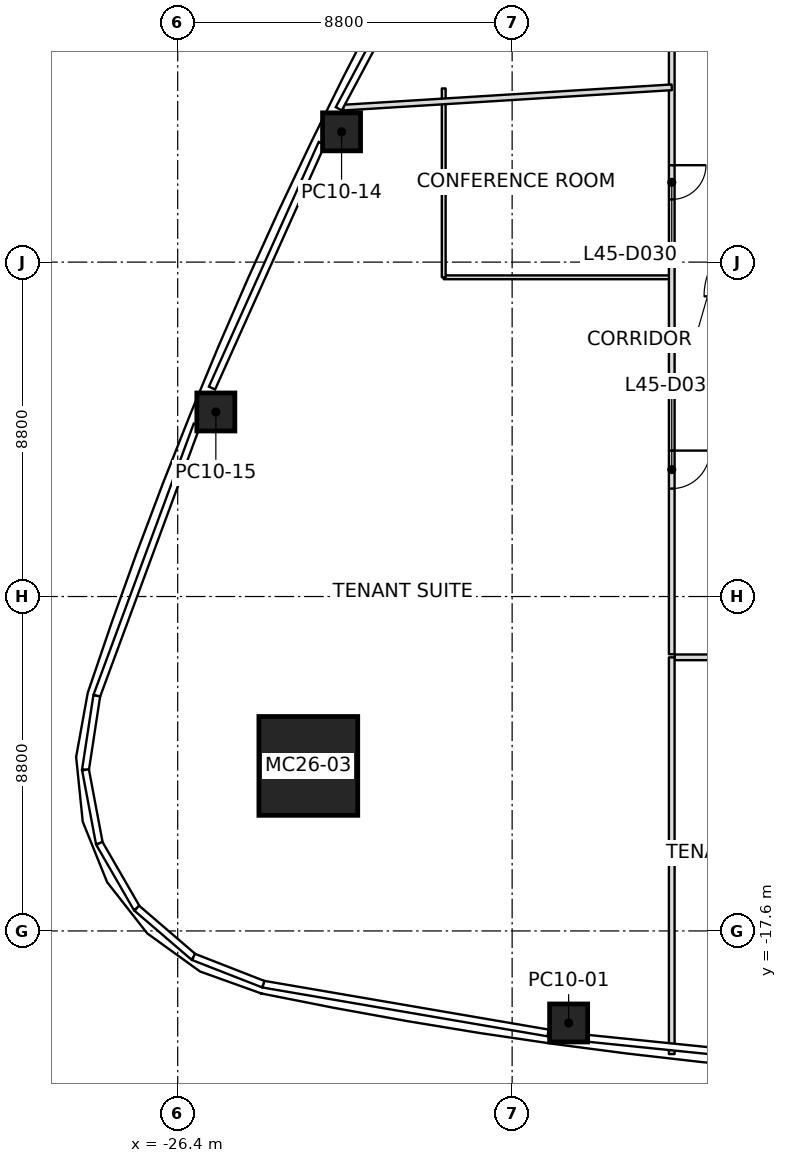
"""IFC4 building model, lengths in metres.
Left out: names, types, materials, properties, quantities, classifications, styles, units other than length and angle.
Written with IfcOpenShell. Run it as: python <this file> out.ifc"""

import sys

from ifc_helpers import new_model, si_unit, direction, frame, frame_2d, origin, origin_2d, place, context, subcontext, project, spatial, rectangle, extrude, element, fill, save


model = new_model("IFC4")
c1 = context("Model", 3, precision=1e-05, world=origin(), true_north=direction((0.0, 1.0)))
c2 = subcontext(c1, "Body", "Model", "MODEL_VIEW")
j1 = project(units=[si_unit("LENGTHUNIT", "METRE"), si_unit("PLANEANGLEUNIT", "RADIAN")], contexts=[c1])
p1 = place(None, origin())
s1 = spatial("IfcSite", under=j1, at=p1, CompositionType="ELEMENT")
p2 = place(p1, origin())
s2 = spatial("IfcBuilding", under=s1, at=p2, CompositionType="ELEMENT")
p3 = place(p2, frame((0.0, 0.0, 201.8)))
s3 = spatial("IfcBuildingStorey", under=s2, at=p3, CompositionType="ELEMENT", Elevation=201.8)
p4 = place(p3, frame((-22.963, -13.258, 0.0), z_axis=(0.027878578444, 0.01616591529, 0.99948058913), x_axis=(0.999611316895, -0.000450857978, -0.027874932523)))
e1 = element("IfcColumn", 1, at=p4, inside=s3, PredefinedType="COLUMN", context=c2, shape_type="SweptSolid", body=[
    extrude(rectangle(XDim=2.6, YDim=2.6, at=origin_2d()), origin(), (0.0, 0.0, 1.0), 4.002),
])
p5 = place(p3, frame((-16.114, -20.022, 0.0), z_axis=(0.017574453011, 0.010434831475, 0.999791104628), x_axis=(-0.990654176494, 0.135455896045, 0.016000088172)))
e2 = element("IfcColumn", 2, at=p5, inside=s3, PredefinedType="COLUMN", context=c2, shape_type="SweptSolid", body=[
    extrude(rectangle(XDim=1.0, YDim=1.0, at=origin_2d()), origin(), (0.0, 0.0, 1.0), 4.001),
])
p6 = place(p3, frame((-22.088, 3.428, 0.0), z_axis=(0.014097689605, 0.002074984617, 0.999898469639), x_axis=(0.440091339145, 0.89791676479, -0.008068253744)))
e3 = element("IfcColumn", 3, at=p6, inside=s3, PredefinedType="COLUMN", context=c2, shape_type="SweptSolid", body=[
    extrude(rectangle(XDim=1.0, YDim=1.0, at=origin_2d()), origin(), (0.0, 0.0, 1.0), 4.0),
])
p7 = place(p3, frame((-25.396, -3.944, 0.0), z_axis=(0.017818554314, 0.009946658744, 0.999791759869), x_axis=(0.378186302211, 0.925592114744, -0.015948603207)))
e4 = element("IfcColumn", 4, at=p7, inside=s3, PredefinedType="COLUMN", context=c2, shape_type="SweptSolid", body=[
    extrude(rectangle(XDim=1.0, YDim=1.0, at=origin_2d()), origin(), (0.0, 0.0, 1.0), 4.001),
])
p8 = place(p3, frame((-13.4, 4.6, 0.0), z_axis=(0.0, 0.0, 1.0), x_axis=(-0.998091317923, -0.061755332455, 0.0)))
e5 = element("IfcWall", 5, at=p8, inside=s3, PredefinedType="PARTITIONING", context=c2, shape_type="SweptSolid", body=[
    extrude(rectangle(XDim=8.662, YDim=0.15, at=frame_2d((4.331, 0.0))), origin(), (0.0, 0.0, 1.0), 3.084),
])
p9 = place(p3, frame((-13.4, -10.4, 0.0), z_axis=(0.0, 0.0, 1.0), x_axis=(0.0, -1.0, 0.0)))
e6 = element("IfcWall", 6, at=p9, inside=s3, PredefinedType="PARTITIONING", context=c2, shape_type="SweptSolid", body=[
    extrude(rectangle(XDim=10.44, YDim=0.15, at=frame_2d((5.22, 0.0))), origin(), (0.0, 0.0, 1.0), 3.084),
])
p10 = place(p3, frame((-13.4, 10.32, 0.0), z_axis=(0.0, 0.0, 1.0), x_axis=(0.0, -1.0, 0.0)))
e7 = element("IfcWall", 7, at=p10, inside=s3, PredefinedType="PARTITIONING", context=c2, shape_type="SweptSolid", body=[
    extrude(rectangle(XDim=20.64, YDim=0.15, at=frame_2d((10.32, 0.0))), origin(), (0.0, 0.0, 1.0), 3.097),
])
p11 = place(p10, frame((2.32, 0.0, 0.0)))
e8 = element("IfcOpeningElement", 8, at=p11, cuts=e7, PredefinedType="OPENING", context=c2, shape_type="SweptSolid", body=[
    extrude(rectangle(XDim=1.0, YDim=2.1, at=frame_2d((0.5, 1.05))), frame((0.0, 0.075, 0.0), z_axis=(0.0, -1.0, 0.0), x_axis=(1.0, 0.0, 0.0)), (0.0, 0.0, 1.0), 0.15),
])
p12 = place(p10, frame((7.77, 0.0, 0.0)))
e9 = element("IfcOpeningElement", 9, at=p12, cuts=e7, PredefinedType="OPENING", context=c2, shape_type="SweptSolid", body=[
    extrude(rectangle(XDim=0.9, YDim=2.1, at=frame_2d((0.45, 1.05))), frame((0.0, 0.075, 0.0), z_axis=(0.0, -1.0, 0.0), x_axis=(1.0, 0.0, 0.0)), (0.0, 0.0, 1.0), 0.15),
])
p13 = place(p10, frame((15.28, 0.0, 0.0)))
e10 = element("IfcOpeningElement", 10, at=p13, cuts=e7, PredefinedType="OPENING", context=c2, shape_type="SweptSolid", body=[
    extrude(rectangle(XDim=1.0, YDim=2.1, at=frame_2d((0.5, 1.05))), frame((0.0, 0.075, 0.0), z_axis=(0.0, -1.0, 0.0), x_axis=(1.0, 0.0, 0.0)), (0.0, 0.0, 1.0), 0.15),
])
p14 = place(p3, frame((-13.32, -10.4, 0.0), z_axis=(0.0, 0.0, 1.0), x_axis=(1.0, 0.0, 0.0)))
e11 = element("IfcWall", 11, at=p14, inside=s3, PredefinedType="PARTITIONING", context=c2, shape_type="SweptSolid", body=[
    extrude(rectangle(XDim=26.64, YDim=0.15, at=frame_2d((13.32, 0.0))), origin(), (0.0, 0.0, 1.0), 3.167),
])
p15 = place(p14, frame((1.82, 0.0, 0.0)))
e12 = element("IfcOpeningElement", 12, at=p15, cuts=e11, PredefinedType="OPENING", context=c2, shape_type="SweptSolid", body=[
    extrude(rectangle(XDim=1.0, YDim=2.1, at=frame_2d((0.5, 1.05))), frame((0.0, 0.075, 0.0), z_axis=(0.0, -1.0, 0.0), x_axis=(1.0, 0.0, 0.0)), (0.0, 0.0, 1.0), 0.15),
])
p16 = place(p14, frame((6.37, 0.0, 0.0)))
e13 = element("IfcOpeningElement", 13, at=p16, cuts=e11, PredefinedType="OPENING", context=c2, shape_type="SweptSolid", body=[
    extrude(rectangle(XDim=0.9, YDim=2.1, at=frame_2d((0.45, 1.05))), frame((0.0, 0.075, 0.0), z_axis=(0.0, -1.0, 0.0), x_axis=(1.0, 0.0, 0.0)), (0.0, 0.0, 1.0), 0.15),
])
p17 = place(p14, frame((12.62, 0.0, 0.0)))
e14 = element("IfcOpeningElement", 14, at=p17, cuts=e11, PredefinedType="OPENING", context=c2, shape_type="SweptSolid", body=[
    extrude(rectangle(XDim=1.0, YDim=2.1, at=frame_2d((0.5, 1.05))), frame((0.0, 0.075, 0.0), z_axis=(0.0, -1.0, 0.0), x_axis=(1.0, 0.0, 0.0)), (0.0, 0.0, 1.0), 0.15),
])
p18 = place(p14, frame((21.47, 0.0, 0.0)))
e15 = element("IfcOpeningElement", 15, at=p18, cuts=e11, PredefinedType="OPENING", context=c2, shape_type="SweptSolid", body=[
    extrude(rectangle(XDim=1.0, YDim=2.1, at=frame_2d((0.5, 1.05))), frame((0.0, 0.075, 0.0), z_axis=(0.0, -1.0, 0.0), x_axis=(1.0, 0.0, 0.0)), (0.0, 0.0, 1.0), 0.15),
])
p19 = place(p3, frame((-13.43, -0.4, 0.0), z_axis=(0.0, 0.0, 1.0), x_axis=(-1.0, 0.0, 0.0)))
e16 = element("IfcWall", 16, at=p19, inside=s3, PredefinedType="PARTITIONING", context=c2, shape_type="SweptSolid", body=[
    extrude(rectangle(XDim=5.97, YDim=0.1, at=frame_2d((2.985, 0.0))), origin(), (0.0, 0.0, 1.0), 3.3),
])
p20 = place(p3, frame((-19.4, -0.4, 0.0), z_axis=(0.0, 0.0, 1.0), x_axis=(0.0, 1.0, 0.0)))
e17 = element("IfcWall", 17, at=p20, inside=s3, PredefinedType="PARTITIONING", context=c2, shape_type="SweptSolid", body=[
    extrude(rectangle(XDim=4.97, YDim=0.1, at=frame_2d((2.485, 0.0))), origin(), (0.0, 0.0, 1.0), 3.3),
])
p21 = place(p12, origin())
e18 = element("IfcDoor", 18, at=p21, inside=s3, OperationType="SINGLE_SWING_RIGHT", PredefinedType="DOOR", context=c2, shape_type="SweptSolid", body=[
    extrude(rectangle(XDim=0.9, YDim=2.1, at=frame_2d((0.45, 1.05))), frame((0.0, 0.025, 0.0), z_axis=(0.0, -1.0, 0.0), x_axis=(1.0, 0.0, 0.0)), (0.0, 0.0, 1.0), 0.05),
])
fill(e9, e18)
p22 = place(p13, origin())
e19 = element("IfcDoor", 19, at=p22, inside=s3, OperationType="SINGLE_SWING_RIGHT", PredefinedType="DOOR", context=c2, shape_type="SweptSolid", body=[
    extrude(rectangle(XDim=1.0, YDim=2.1, at=frame_2d((0.5, 1.05))), frame((0.0, 0.025, 0.0), z_axis=(0.0, -1.0, 0.0), x_axis=(1.0, 0.0, 0.0)), (0.0, 0.0, 1.0), 0.05),
])
fill(e10, e19)
save(model, sys.argv[1])
